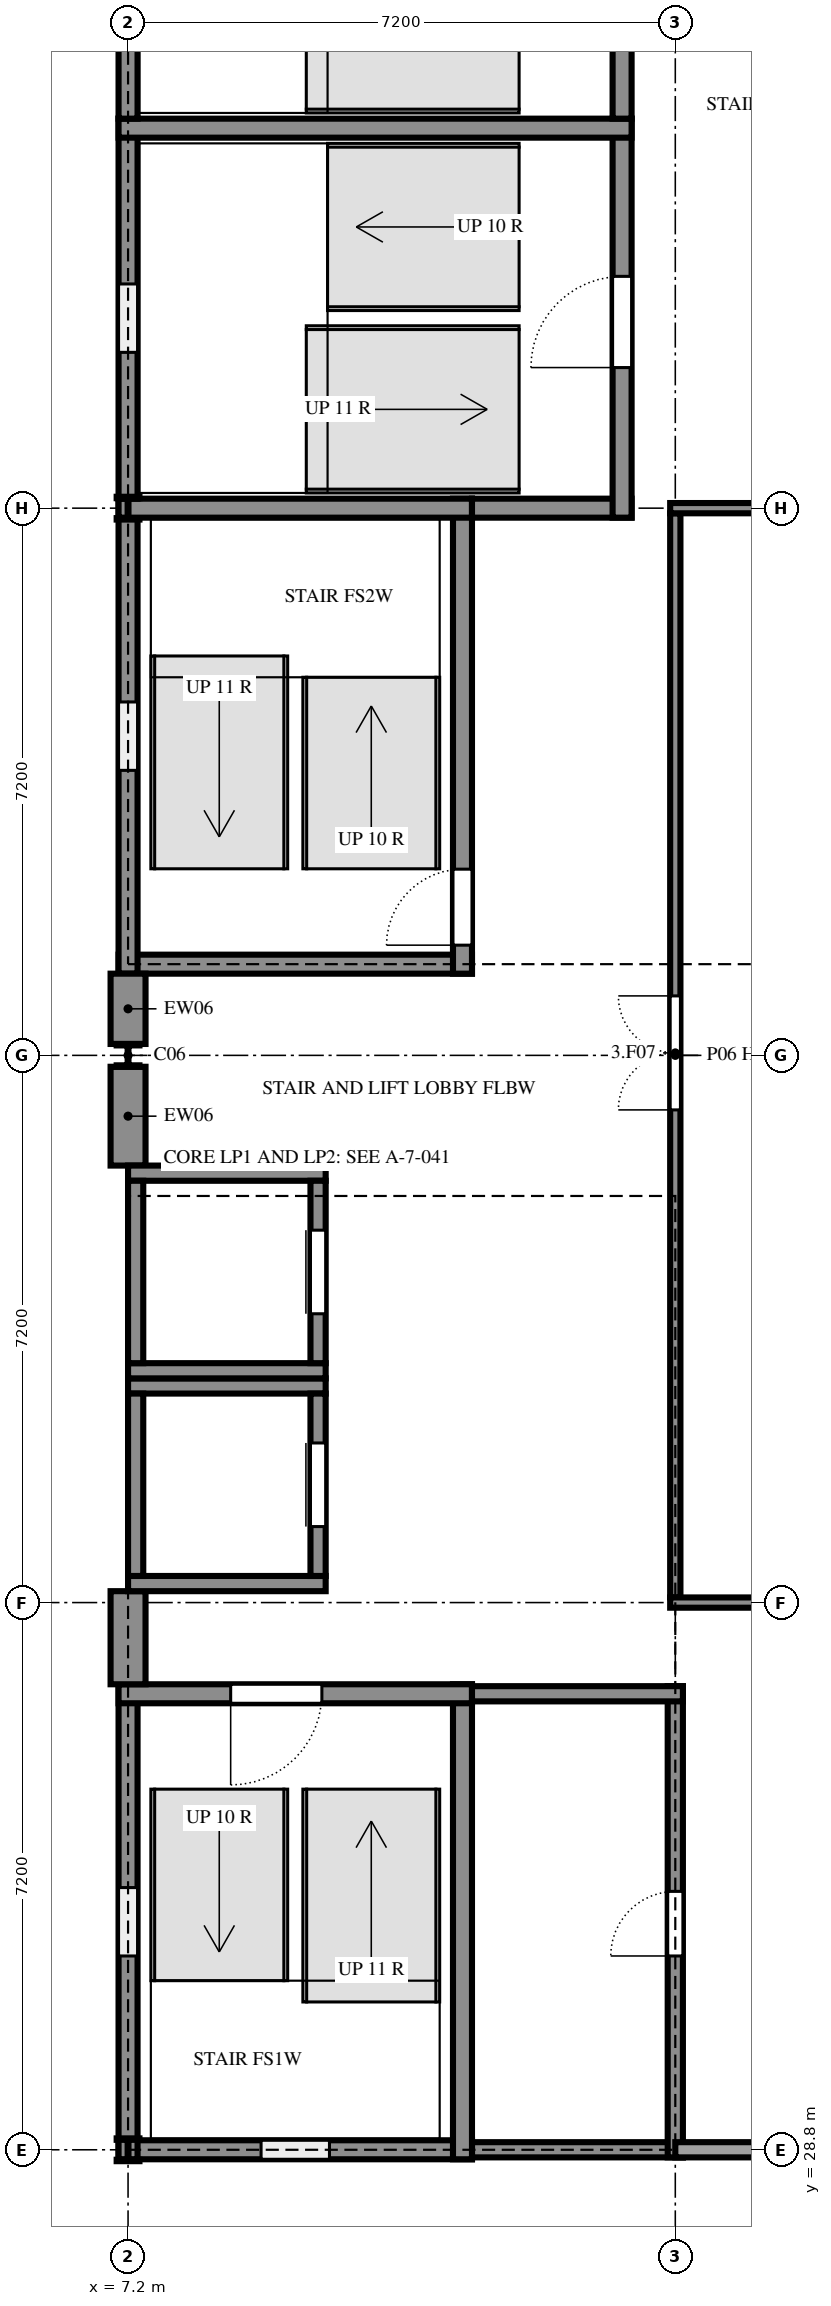
"""IFC4 building model, lengths in metres.
Left out: names, types, materials, properties, quantities, classifications, styles, units other than length and angle.
Written with IfcOpenShell. Run it as: python <this file> out.ifc"""

import sys

from ifc_helpers import new_model, si_unit, direction, frame, frame_2d, origin, origin_2d, place, context, subcontext, project, spatial, rectangle, i_section, extrude, element, fill, save


model = new_model("IFC4")
c1 = context("Model", 3, precision=1e-05, world=origin(), true_north=direction((0.0, 1.0)))
c2 = subcontext(c1, "Body", "Model", "MODEL_VIEW")
j1 = project(units=[si_unit("LENGTHUNIT", "METRE"), si_unit("PLANEANGLEUNIT", "RADIAN")], contexts=[c1])
p1 = place(None, origin())
s1 = spatial("IfcSite", under=j1, at=p1, CompositionType="ELEMENT")
p2 = place(p1, origin())
s2 = spatial("IfcBuilding", under=s1, at=p2, CompositionType="ELEMENT")
p3 = place(p2, frame((0.0, 0.0, 10.8)))
s3 = spatial("IfcBuildingStorey", under=s2, at=p3, CompositionType="ELEMENT", Elevation=10.8)
for number, where, z_axis, x_axis in (
    (1, (7.2, 28.8, 0.0), (0.0, 0.0, 1.0), (1.0, 0.0, 0.0)),
    (2, (7.2, 43.2, 0.0), (0.0, 0.0, 1.0), (1.0, 0.0, 0.0)),
    (3, (7.2, 50.4, 0.0), (0.0, 0.0, 1.0), (1.0, 0.0, 0.0)),
):
    element("IfcColumn", number, at=place(p3, frame(where, z_axis=z_axis, x_axis=x_axis)), inside=s3, PredefinedType="COLUMN", context=c2, shape_type="SweptSolid", body=[
        extrude(i_section(OverallWidth=0.3, OverallDepth=0.3, WebThickness=0.011, FlangeThickness=0.019, FilletRadius=0.027, at=origin_2d()), origin(), (0.0, 0.0, 1.0), 3.6),
    ])
p4 = place(p3, frame((7.075, 28.8, 0.0), z_axis=(0.0, 0.0, 1.0), x_axis=(1.0, 0.0, 0.0)))
e4 = element("IfcWall", 4, at=p4, inside=s3, PredefinedType="SHEAR", context=c2, shape_type="SweptSolid", body=[
    extrude(rectangle(XDim=4.65, YDim=0.25, at=frame_2d((2.325, 0.0))), origin(), (0.0, 0.0, 1.0), 3.6),
])
p5 = place(p4, frame((1.875, 0.0, 0.6)))
e5 = element("IfcOpeningElement", 5, at=p5, cuts=e4, PredefinedType="OPENING", context=c2, shape_type="SweptSolid", body=[
    extrude(rectangle(XDim=0.9, YDim=2.1, at=frame_2d((0.45, 1.05))), frame((0.0, 0.135, 0.0), z_axis=(0.0, -1.0, 0.0), x_axis=(1.0, 0.0, 0.0)), (0.0, 0.0, 1.0), 0.27),
])
p6 = place(p3, frame((11.725, 28.8, 0.0), z_axis=(0.0, 0.0, 1.0), x_axis=(1.0, 0.0, 0.0)))
e6 = element("IfcWall", 6, at=p6, inside=s3, PredefinedType="SHEAR", context=c2, shape_type="SweptSolid", body=[
    extrude(rectangle(XDim=2.775, YDim=0.2, at=frame_2d((1.387, 0.0))), origin(), (0.0, 0.0, 1.0), 3.6),
])
p7 = place(p3, frame((11.6, 28.675, 0.0), z_axis=(0.0, 0.0, 1.0), x_axis=(0.0, 1.0, 0.0)))
e7 = element("IfcWall", 7, at=p7, inside=s3, PredefinedType="SHEAR", context=c2, shape_type="SweptSolid", body=[
    extrude(rectangle(XDim=6.25, YDim=0.25, at=frame_2d((3.125, 0.0))), origin(), (0.0, 0.0, 1.0), 3.6),
])
p8 = place(p3, frame((14.4, 28.7, 0.0), z_axis=(0.0, 0.0, 1.0), x_axis=(0.0, 1.0, 0.0)))
e8 = element("IfcWall", 8, at=p8, inside=s3, PredefinedType="SHEAR", context=c2, shape_type="SweptSolid", body=[
    extrude(rectangle(XDim=6.2, YDim=0.2, at=frame_2d((3.1, 0.0))), origin(), (0.0, 0.0, 1.0), 3.6),
])
p9 = place(p8, frame((2.65, 0.0, 0.0)))
e9 = element("IfcOpeningElement", 9, at=p9, cuts=e8, PredefinedType="OPENING", context=c2, shape_type="SweptSolid", body=[
    extrude(rectangle(XDim=0.85, YDim=2.1, at=frame_2d((0.425, 1.05))), frame((0.0, 0.11, 0.0), z_axis=(0.0, -1.0, 0.0), x_axis=(1.0, 0.0, 0.0)), (0.0, 0.0, 1.0), 0.22),
])
p10 = place(p3, frame((7.2, 34.925, 0.0), z_axis=(0.0, 0.0, 1.0), x_axis=(0.0, -1.0, 0.0)))
e10 = element("IfcWall", 10, at=p10, inside=s3, PredefinedType="SHEAR", context=c2, shape_type="SweptSolid", body=[
    extrude(rectangle(XDim=6.25, YDim=0.25, at=frame_2d((3.125, 0.0))), origin(), (0.0, 0.0, 1.0), 3.6),
])
p11 = place(p10, frame((2.675, 0.0, 0.6)))
e11 = element("IfcOpeningElement", 11, at=p11, cuts=e10, PredefinedType="OPENING", context=c2, shape_type="SweptSolid", body=[
    extrude(rectangle(XDim=0.9, YDim=2.1, at=frame_2d((0.45, 1.05))), frame((0.0, 0.135, 0.0), z_axis=(0.0, -1.0, 0.0), x_axis=(1.0, 0.0, 0.0)), (0.0, 0.0, 1.0), 0.27),
])
p12 = place(p3, frame((11.725, 34.8, 0.0), z_axis=(0.0, 0.0, 1.0), x_axis=(-1.0, 0.0, 0.0)))
e12 = element("IfcWall", 12, at=p12, inside=s3, PredefinedType="SHEAR", context=c2, shape_type="SweptSolid", body=[
    extrude(rectangle(XDim=4.65, YDim=0.25, at=frame_2d((2.325, 0.0))), origin(), (0.0, 0.0, 1.0), 3.6),
])
p13 = place(p12, frame((1.975, 0.0, 0.0)))
e13 = element("IfcOpeningElement", 13, at=p13, cuts=e12, PredefinedType="OPENING", context=c2, shape_type="SweptSolid", body=[
    extrude(rectangle(XDim=1.2, YDim=2.4, at=frame_2d((0.6, 1.2))), frame((0.0, 0.135, 0.0), z_axis=(0.0, -1.0, 0.0), x_axis=(1.0, 0.0, 0.0)), (0.0, 0.0, 1.0), 0.27),
])
p14 = place(p3, frame((14.5, 34.8, 0.0), z_axis=(0.0, 0.0, 1.0), x_axis=(-1.0, 0.0, 0.0)))
e14 = element("IfcWall", 14, at=p14, inside=s3, PredefinedType="SHEAR", context=c2, shape_type="SweptSolid", body=[
    extrude(rectangle(XDim=2.775, YDim=0.2, at=frame_2d((1.387, 0.0))), origin(), (0.0, 0.0, 1.0), 3.6),
])
p15 = place(p3, frame((7.075, 44.4, 0.0), z_axis=(0.0, 0.0, 1.0), x_axis=(1.0, 0.0, 0.0)))
e15 = element("IfcWall", 15, at=p15, inside=s3, PredefinedType="SHEAR", context=c2, shape_type="SweptSolid", body=[
    extrude(rectangle(XDim=4.65, YDim=0.25, at=frame_2d((2.325, 0.0))), origin(), (0.0, 0.0, 1.0), 3.6),
])
p16 = place(p3, frame((11.6, 44.275, 0.0), z_axis=(0.0, 0.0, 1.0), x_axis=(0.0, 1.0, 0.0)))
e16 = element("IfcWall", 16, at=p16, inside=s3, PredefinedType="SHEAR", context=c2, shape_type="SweptSolid", body=[
    extrude(rectangle(XDim=6.25, YDim=0.25, at=frame_2d((3.125, 0.0))), origin(), (0.0, 0.0, 1.0), 3.6),
])
p17 = place(p16, frame((0.375, 0.0, 0.0)))
e17 = element("IfcOpeningElement", 17, at=p17, cuts=e16, PredefinedType="OPENING", context=c2, shape_type="SweptSolid", body=[
    extrude(rectangle(XDim=1.0, YDim=2.4, at=frame_2d((0.5, 1.2))), frame((0.0, 0.135, 0.0), z_axis=(0.0, -1.0, 0.0), x_axis=(1.0, 0.0, 0.0)), (0.0, 0.0, 1.0), 0.27),
])
p18 = place(p3, frame((7.2, 50.525, 0.0), z_axis=(0.0, 0.0, 1.0), x_axis=(0.0, -1.0, 0.0)))
e18 = element("IfcWall", 18, at=p18, inside=s3, PredefinedType="SHEAR", context=c2, shape_type="SweptSolid", body=[
    extrude(rectangle(XDim=6.25, YDim=0.25, at=frame_2d((3.125, 0.0))), origin(), (0.0, 0.0, 1.0), 3.6),
])
p19 = place(p18, frame((2.675, 0.0, 0.6)))
e19 = element("IfcOpeningElement", 19, at=p19, cuts=e18, PredefinedType="OPENING", context=c2, shape_type="SweptSolid", body=[
    extrude(rectangle(XDim=0.9, YDim=2.1, at=frame_2d((0.45, 1.05))), frame((0.0, 0.135, 0.0), z_axis=(0.0, -1.0, 0.0), x_axis=(1.0, 0.0, 0.0)), (0.0, 0.0, 1.0), 0.27),
])
p20 = place(p3, frame((11.725, 50.4, 0.0), z_axis=(0.0, 0.0, 1.0), x_axis=(-1.0, 0.0, 0.0)))
e20 = element("IfcWall", 20, at=p20, inside=s3, PredefinedType="SHEAR", context=c2, shape_type="SweptSolid", body=[
    extrude(rectangle(XDim=4.65, YDim=0.25, at=frame_2d((2.325, 0.0))), origin(), (0.0, 0.0, 1.0), 3.6),
])
p21 = place(p3, frame((11.725, 50.4, 0.0), z_axis=(0.0, 0.0, 1.0), x_axis=(1.0, 0.0, 0.0)))
e21 = element("IfcWall", 21, at=p21, inside=s3, PredefinedType="SHEAR", context=c2, shape_type="SweptSolid", body=[
    extrude(rectangle(XDim=2.1, YDim=0.25, at=frame_2d((1.05, 0.0))), origin(), (0.0, 0.0, 1.0), 3.6),
])
p22 = place(p3, frame((13.7, 50.275, 0.0), z_axis=(0.0, 0.0, 1.0), x_axis=(0.0, 1.0, 0.0)))
e22 = element("IfcWall", 22, at=p22, inside=s3, PredefinedType="SHEAR", context=c2, shape_type="SweptSolid", body=[
    extrude(rectangle(XDim=5.25, YDim=0.25, at=frame_2d((2.625, 0.0))), origin(), (0.0, 0.0, 1.0), 3.6),
])
p23 = place(p22, frame((1.975, 0.0, 0.0)))
e23 = element("IfcOpeningElement", 23, at=p23, cuts=e22, PredefinedType="OPENING", context=c2, shape_type="SweptSolid", body=[
    extrude(rectangle(XDim=1.2, YDim=2.4, at=frame_2d((0.6, 1.2))), frame((0.0, 0.135, 0.0), z_axis=(0.0, -1.0, 0.0), x_axis=(1.0, 0.0, 0.0)), (0.0, 0.0, 1.0), 0.27),
])
p24 = place(p3, frame((7.2, 55.525, 0.0), z_axis=(0.0, 0.0, 1.0), x_axis=(0.0, -1.0, 0.0)))
e24 = element("IfcWall", 24, at=p24, inside=s3, PredefinedType="SHEAR", context=c2, shape_type="SweptSolid", body=[
    extrude(rectangle(XDim=5.0, YDim=0.25, at=frame_2d((2.5, 0.0))), origin(), (0.0, 0.0, 1.0), 3.6),
])
p25 = place(p24, frame((2.175, 0.0, 0.6)))
e25 = element("IfcOpeningElement", 25, at=p25, cuts=e24, PredefinedType="OPENING", context=c2, shape_type="SweptSolid", body=[
    extrude(rectangle(XDim=0.9, YDim=2.1, at=frame_2d((0.45, 1.05))), frame((0.0, 0.135, 0.0), z_axis=(0.0, -1.0, 0.0), x_axis=(1.0, 0.0, 0.0)), (0.0, 0.0, 1.0), 0.27),
])
p26 = place(p3, frame((13.825, 55.4, 0.0), z_axis=(0.0, 0.0, 1.0), x_axis=(-1.0, 0.0, 0.0)))
e26 = element("IfcWall", 26, at=p26, inside=s3, PredefinedType="SHEAR", context=c2, shape_type="SweptSolid", body=[
    extrude(rectangle(XDim=6.75, YDim=0.25, at=frame_2d((3.375, 0.0))), origin(), (0.0, 0.0, 1.0), 3.6),
])
p27 = place(p3, frame((13.7, 55.525, 0.0), z_axis=(0.0, 0.0, 1.0), x_axis=(0.0, 1.0, 0.0)))
e27 = element("IfcWall", 27, at=p27, inside=s3, PredefinedType="SHEAR", context=c2, shape_type="SweptSolid", body=[
    extrude(rectangle(XDim=5.0, YDim=0.25, at=frame_2d((2.5, 0.0))), origin(), (0.0, 0.0, 1.0), 3.6),
])
p28 = place(p3, frame((7.2, 60.525, 0.0), z_axis=(0.0, 0.0, 1.0), x_axis=(0.0, -1.0, 0.0)))
e28 = element("IfcWall", 28, at=p28, inside=s3, PredefinedType="SHEAR", context=c2, shape_type="SweptSolid", body=[
    extrude(rectangle(XDim=5.0, YDim=0.25, at=frame_2d((2.5, 0.0))), origin(), (0.0, 0.0, 1.0), 3.6),
])
p29 = place(p28, frame((2.175, 0.0, 0.6)))
e29 = element("IfcOpeningElement", 29, at=p29, cuts=e28, PredefinedType="OPENING", context=c2, shape_type="SweptSolid", body=[
    extrude(rectangle(XDim=0.9, YDim=2.1, at=frame_2d((0.45, 1.05))), frame((0.0, 0.135, 0.0), z_axis=(0.0, -1.0, 0.0), x_axis=(1.0, 0.0, 0.0)), (0.0, 0.0, 1.0), 0.27),
])
p30 = place(p3, frame((7.2, 44.275, 0.0), z_axis=(0.0, 0.0, 1.0), x_axis=(0.0, -1.0, 0.0)))
e30 = element("IfcWall", 30, at=p30, inside=s3, PredefinedType="SOLIDWALL", context=c2, shape_type="SweptSolid", body=[
    extrude(rectangle(XDim=0.925, YDim=0.46, at=frame_2d((0.462, 0.0))), origin(), (0.0, 0.0, 1.0), 3.22),
])
p31 = place(p3, frame((7.2, 43.05, 0.0), z_axis=(0.0, 0.0, 1.0), x_axis=(0.0, -1.0, 0.0)))
e31 = element("IfcWall", 31, at=p31, inside=s3, PredefinedType="SOLIDWALL", context=c2, shape_type="SweptSolid", body=[
    extrude(rectangle(XDim=1.3, YDim=0.46, at=frame_2d((0.65, 0.0))), origin(), (0.0, 0.0, 1.0), 3.22),
])
p32 = place(p3, frame((7.2, 36.15, 0.0), z_axis=(0.0, 0.0, 1.0), x_axis=(0.0, -1.0, 0.0)))
e32 = element("IfcWall", 32, at=p32, inside=s3, PredefinedType="SOLIDWALL", context=c2, shape_type="SweptSolid", body=[
    extrude(rectangle(XDim=1.225, YDim=0.46, at=frame_2d((0.612, 0.0))), origin(), (0.0, 0.0, 1.0), 3.22),
])
for number, where, z_axis, x_axis in (
    (33, (7.2, 36.25, 0.0), (0.0, 0.0, 1.0), (1.0, 0.0, 0.0)),
    (34, (7.2, 38.85, 0.0), (0.0, 0.0, 1.0), (1.0, 0.0, 0.0)),
):
    element("IfcWall", number, at=place(p3, frame(where, z_axis=z_axis, x_axis=x_axis)), inside=s3, PredefinedType="SHEAR", context=c2, shape_type="SweptSolid", body=[
        extrude(rectangle(XDim=2.6, YDim=0.2, at=frame_2d((1.3, 0.0))), origin(), (0.0, 0.0, 1.0), 3.6),
    ])
p33 = place(p3, frame((7.3, 36.35, 0.0), z_axis=(0.0, 0.0, 1.0), x_axis=(0.0, 1.0, 0.0)))
e35 = element("IfcWall", 35, at=p33, inside=s3, PredefinedType="SHEAR", context=c2, shape_type="SweptSolid", body=[
    extrude(rectangle(XDim=2.4, YDim=0.2, at=frame_2d((1.2, 0.0))), origin(), (0.0, 0.0, 1.0), 3.6),
])
p34 = place(p3, frame((9.7, 36.35, 0.0), z_axis=(0.0, 0.0, 1.0), x_axis=(0.0, 1.0, 0.0)))
e36 = element("IfcWall", 36, at=p34, inside=s3, PredefinedType="SHEAR", context=c2, shape_type="SweptSolid", body=[
    extrude(rectangle(XDim=2.4, YDim=0.2, at=frame_2d((1.2, 0.0))), origin(), (0.0, 0.0, 1.0), 3.6),
])
p35 = place(p34, frame((0.65, 0.0, 0.0)))
e37 = element("IfcOpeningElement", 37, at=p35, cuts=e36, PredefinedType="OPENING", context=c2, shape_type="SweptSolid", body=[
    extrude(rectangle(XDim=1.1, YDim=2.1, at=frame_2d((0.55, 1.05))), frame((0.0, 0.11, 0.0), z_axis=(0.0, -1.0, 0.0), x_axis=(1.0, 0.0, 0.0)), (0.0, 0.0, 1.0), 0.22),
])
for number, where, z_axis, x_axis in (
    (38, (7.2, 39.05, 0.0), (0.0, 0.0, 1.0), (1.0, 0.0, 0.0)),
    (39, (7.2, 41.65, 0.0), (0.0, 0.0, 1.0), (1.0, 0.0, 0.0)),
):
    element("IfcWall", number, at=place(p3, frame(where, z_axis=z_axis, x_axis=x_axis)), inside=s3, PredefinedType="SHEAR", context=c2, shape_type="SweptSolid", body=[
        extrude(rectangle(XDim=2.6, YDim=0.2, at=frame_2d((1.3, 0.0))), origin(), (0.0, 0.0, 1.0), 3.6),
    ])
p36 = place(p3, frame((7.3, 39.15, 0.0), z_axis=(0.0, 0.0, 1.0), x_axis=(0.0, 1.0, 0.0)))
e40 = element("IfcWall", 40, at=p36, inside=s3, PredefinedType="SHEAR", context=c2, shape_type="SweptSolid", body=[
    extrude(rectangle(XDim=2.4, YDim=0.2, at=frame_2d((1.2, 0.0))), origin(), (0.0, 0.0, 1.0), 3.6),
])
p37 = place(p3, frame((9.7, 39.15, 0.0), z_axis=(0.0, 0.0, 1.0), x_axis=(0.0, 1.0, 0.0)))
e41 = element("IfcWall", 41, at=p37, inside=s3, PredefinedType="SHEAR", context=c2, shape_type="SweptSolid", body=[
    extrude(rectangle(XDim=2.4, YDim=0.2, at=frame_2d((1.2, 0.0))), origin(), (0.0, 0.0, 1.0), 3.6),
])
p38 = place(p37, frame((0.65, 0.0, 0.0)))
e42 = element("IfcOpeningElement", 42, at=p38, cuts=e41, PredefinedType="OPENING", context=c2, shape_type="SweptSolid", body=[
    extrude(rectangle(XDim=1.1, YDim=2.1, at=frame_2d((0.55, 1.05))), frame((0.0, 0.11, 0.0), z_axis=(0.0, -1.0, 0.0), x_axis=(1.0, 0.0, 0.0)), (0.0, 0.0, 1.0), 0.22),
])
p39 = place(p3, frame((14.4, 50.333, 0.0), z_axis=(0.0, 0.0, 1.0), x_axis=(0.0, -1.0, 0.0)))
e43 = element("IfcWall", 43, at=p39, inside=s3, PredefinedType="PARTITIONING", context=c2, shape_type="SweptSolid", body=[
    extrude(rectangle(XDim=14.265, YDim=0.135, at=frame_2d((7.133, 0.0))), origin(), (0.0, 0.0, 1.0), 3.12),
])
p40 = place(p39, frame((6.35, 0.0, 0.0)))
e44 = element("IfcOpeningElement", 44, at=p40, cuts=e43, PredefinedType="OPENING", context=c2, shape_type="SweptSolid", body=[
    extrude(rectangle(XDim=1.5, YDim=2.1, at=frame_2d((0.75, 1.05))), frame((0.0, 0.077, 0.0), z_axis=(0.0, -1.0, 0.0), x_axis=(1.0, 0.0, 0.0)), (0.0, 0.0, 1.0), 0.155),
])
p41 = place(p3, frame((18.0, 50.4, 0.0), z_axis=(0.0, 0.0, 1.0), x_axis=(-1.0, 0.0, 0.0)))
e45 = element("IfcWall", 45, at=p41, inside=s3, PredefinedType="PARTITIONING", context=c2, shape_type="SweptSolid", body=[
    extrude(rectangle(XDim=3.667, YDim=0.135, at=frame_2d((1.834, 0.0))), origin(), (0.0, 0.0, 1.0), 3.09),
])
p42 = place(p3, frame((14.333, 36.0, 0.0), z_axis=(0.0, 0.0, 1.0), x_axis=(1.0, 0.0, 0.0)))
e46 = element("IfcWall", 46, at=p42, inside=s3, PredefinedType="PARTITIONING", context=c2, shape_type="SweptSolid", body=[
    extrude(rectangle(XDim=7.268, YDim=0.135, at=frame_2d((3.634, 0.0))), origin(), (0.0, 0.0, 1.0), 2.82),
])
p43 = place(p5, origin())
e47 = element("IfcWindow", 47, at=p43, inside=s3, PartitioningType="SINGLE_PANEL", PredefinedType="WINDOW", context=c2, shape_type="SweptSolid", body=[
    extrude(rectangle(XDim=0.9, YDim=2.1, at=frame_2d((0.45, 1.05))), frame((0.0, 0.03, 0.0), z_axis=(0.0, -1.0, 0.0), x_axis=(1.0, 0.0, 0.0)), (0.0, 0.0, 1.0), 0.06),
])
fill(e5, e47)
p44 = place(p19, origin())
e48 = element("IfcWindow", 48, at=p44, inside=s3, PartitioningType="SINGLE_PANEL", PredefinedType="WINDOW", context=c2, shape_type="SweptSolid", body=[
    extrude(rectangle(XDim=0.9, YDim=2.1, at=frame_2d((0.45, 1.05))), frame((0.0, 0.03, 0.0), z_axis=(0.0, -1.0, 0.0), x_axis=(1.0, 0.0, 0.0)), (0.0, 0.0, 1.0), 0.06),
])
fill(e19, e48)
p45 = place(p11, origin())
e49 = element("IfcWindow", 49, at=p45, inside=s3, PartitioningType="SINGLE_PANEL", PredefinedType="WINDOW", context=c2, shape_type="SweptSolid", body=[
    extrude(rectangle(XDim=0.9, YDim=2.1, at=frame_2d((0.45, 1.05))), frame((0.0, 0.03, 0.0), z_axis=(0.0, -1.0, 0.0), x_axis=(1.0, 0.0, 0.0)), (0.0, 0.0, 1.0), 0.06),
])
fill(e11, e49)
p46 = place(p25, origin())
e50 = element("IfcWindow", 50, at=p46, inside=s3, PartitioningType="SINGLE_PANEL", PredefinedType="WINDOW", context=c2, shape_type="SweptSolid", body=[
    extrude(rectangle(XDim=0.9, YDim=2.1, at=frame_2d((0.45, 1.05))), frame((0.0, 0.03, 0.0), z_axis=(0.0, -1.0, 0.0), x_axis=(1.0, 0.0, 0.0)), (0.0, 0.0, 1.0), 0.06),
])
fill(e25, e50)
p47 = place(p35, origin())
e51 = element("IfcDoor", 51, at=p47, inside=s3, OperationType="SLIDING_TO_LEFT", PredefinedType="DOOR", context=c2, shape_type="SweptSolid", body=[
    extrude(rectangle(XDim=1.1, YDim=2.1, at=frame_2d((0.55, 1.05))), frame((0.0, 0.025, 0.0), z_axis=(0.0, -1.0, 0.0), x_axis=(1.0, 0.0, 0.0)), (0.0, 0.0, 1.0), 0.05),
])
fill(e37, e51)
p48 = place(p38, origin())
e52 = element("IfcDoor", 52, at=p48, inside=s3, OperationType="SLIDING_TO_LEFT", PredefinedType="DOOR", context=c2, shape_type="SweptSolid", body=[
    extrude(rectangle(XDim=1.1, YDim=2.1, at=frame_2d((0.55, 1.05))), frame((0.0, 0.025, 0.0), z_axis=(0.0, -1.0, 0.0), x_axis=(1.0, 0.0, 0.0)), (0.0, 0.0, 1.0), 0.05),
])
fill(e42, e52)
p49 = place(p13, origin())
e53 = element("IfcDoor", 53, at=p49, inside=s3, OperationType="SINGLE_SWING_LEFT", PredefinedType="DOOR", context=c2, shape_type="SweptSolid", body=[
    extrude(rectangle(XDim=1.2, YDim=2.4, at=frame_2d((0.6, 1.2))), frame((0.0, 0.025, 0.0), z_axis=(0.0, -1.0, 0.0), x_axis=(1.0, 0.0, 0.0)), (0.0, 0.0, 1.0), 0.05),
])
fill(e13, e53)
p50 = place(p17, origin())
e54 = element("IfcDoor", 54, at=p50, inside=s3, OperationType="SINGLE_SWING_RIGHT", PredefinedType="DOOR", context=c2, shape_type="SweptSolid", body=[
    extrude(rectangle(XDim=1.0, YDim=2.4, at=frame_2d((0.5, 1.2))), frame((0.0, 0.025, 0.0), z_axis=(0.0, -1.0, 0.0), x_axis=(1.0, 0.0, 0.0)), (0.0, 0.0, 1.0), 0.05),
])
fill(e17, e54)
p51 = place(p9, origin())
e55 = element("IfcDoor", 55, at=p51, inside=s3, OperationType="SINGLE_SWING_RIGHT", PredefinedType="DOOR", context=c2, shape_type="SweptSolid", body=[
    extrude(rectangle(XDim=0.85, YDim=2.1, at=frame_2d((0.425, 1.05))), frame((0.0, 0.025, 0.0), z_axis=(0.0, -1.0, 0.0), x_axis=(1.0, 0.0, 0.0)), (0.0, 0.0, 1.0), 0.05),
])
fill(e9, e55)
p52 = place(p23, origin())
e56 = element("IfcDoor", 56, at=p52, inside=s3, OperationType="SINGLE_SWING_RIGHT", PredefinedType="DOOR", context=c2, shape_type="SweptSolid", body=[
    extrude(rectangle(XDim=1.2, YDim=2.4, at=frame_2d((0.6, 1.2))), frame((0.0, 0.025, 0.0), z_axis=(0.0, -1.0, 0.0), x_axis=(1.0, 0.0, 0.0)), (0.0, 0.0, 1.0), 0.05),
])
fill(e23, e56)
p53 = place(p40, frame((1.5, 0.0, 0.0), z_axis=(0.0, 0.0, 1.0), x_axis=(-1.0, 0.0, 0.0)))
e57 = element("IfcDoor", 57, at=p53, inside=s3, OperationType="DOUBLE_DOOR_SINGLE_SWING", PredefinedType="DOOR", context=c2, shape_type="SweptSolid", body=[
    extrude(rectangle(XDim=1.5, YDim=2.1, at=frame_2d((0.75, 1.05))), frame((0.0, 0.025, 0.0), z_axis=(0.0, -1.0, 0.0), x_axis=(1.0, 0.0, 0.0)), (0.0, 0.0, 1.0), 0.05),
])
fill(e44, e57)
save(model, sys.argv[1])
